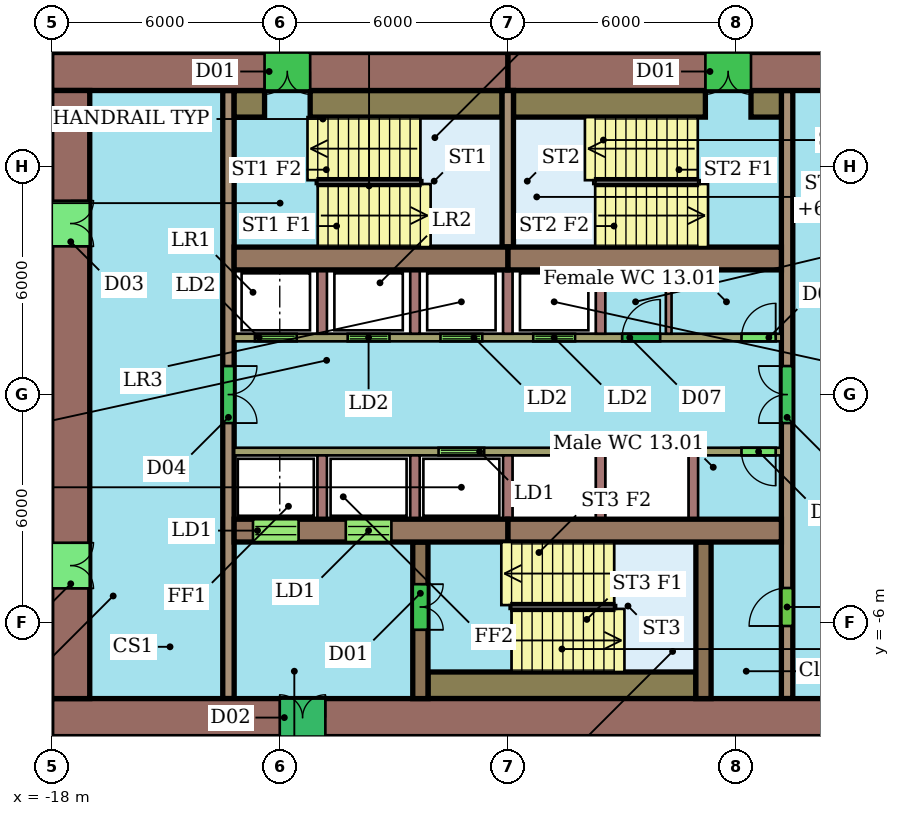
"""IFC4 building model, lengths in metres.
Left out: names, types, materials, properties, quantities, classifications, styles, units other than length and angle.
Written with IfcOpenShell. Run it as: python <this file> out.ifc"""

import sys

from ifc_helpers import new_model, si_unit, direction, frame, frame_2d, origin, place, context, subcontext, project, spatial, rectangle, extrude, element, fill, save


model = new_model("IFC4")
c1 = context("Model", 3, precision=1e-05, world=origin(), true_north=direction((0.0, 1.0)))
c2 = subcontext(c1, "Body", "Model", "MODEL_VIEW")
j1 = project(units=[si_unit("LENGTHUNIT", "METRE"), si_unit("PLANEANGLEUNIT", "RADIAN")], contexts=[c1])
p1 = place(None, origin())
s1 = spatial("IfcSite", under=j1, at=p1, CompositionType="ELEMENT")
p2 = place(p1, origin())
s2 = spatial("IfcBuilding", under=s1, at=p2, CompositionType="ELEMENT")
p3 = place(p2, frame((0.0, 0.0, 65.6)))
s3 = spatial("IfcBuildingStorey", under=s2, at=p3, CompositionType="ELEMENT", Elevation=65.6)
p4 = place(p3, frame((6.0, 8.5, 0.0), z_axis=(0.0, 0.0, 1.0), x_axis=(-1.0, 0.0, 0.0)))
e1 = element("IfcWall", 1, at=p4, inside=s3, PredefinedType="SHEAR", context=c2, shape_type="SweptSolid", body=[
    extrude(rectangle(XDim=12.0, YDim=1.0, at=frame_2d((6.0, 0.0))), origin(), (0.0, 0.0, 1.0), 3.4),
])
p5 = place(p4, frame((5.6, 0.0, 0.0)))
e2 = element("IfcOpeningElement", 2, at=p5, cuts=e1, PredefinedType="OPENING", context=c2, shape_type="SweptSolid", body=[
    extrude(rectangle(XDim=1.2, YDim=2.1, at=frame_2d((0.6, 1.05))), frame((0.0, 0.51, 0.0), z_axis=(0.0, -1.0, 0.0), x_axis=(1.0, 0.0, 0.0)), (0.0, 0.0, 1.0), 1.02),
])
p6 = place(p3, frame((-6.0, 8.5, 0.0), z_axis=(0.0, 0.0, 1.0), x_axis=(-1.0, 0.0, 0.0)))
e3 = element("IfcWall", 3, at=p6, inside=s3, PredefinedType="SHEAR", context=c2, shape_type="SweptSolid", body=[
    extrude(rectangle(XDim=12.0, YDim=1.0, at=frame_2d((6.0, 0.0))), origin(), (0.0, 0.0, 1.0), 3.4),
])
p7 = place(p6, frame((5.2, 0.0, 0.0)))
e4 = element("IfcOpeningElement", 4, at=p7, cuts=e3, PredefinedType="OPENING", context=c2, shape_type="SweptSolid", body=[
    extrude(rectangle(XDim=1.2, YDim=2.1, at=frame_2d((0.6, 1.05))), frame((0.0, 0.51, 0.0), z_axis=(0.0, -1.0, 0.0), x_axis=(1.0, 0.0, 0.0)), (0.0, 0.0, 1.0), 1.02),
])
p8 = place(p3, frame((-18.0, -8.5, 0.0), z_axis=(0.0, 0.0, 1.0), x_axis=(1.0, 0.0, 0.0)))
e5 = element("IfcWall", 5, at=p8, inside=s3, PredefinedType="SHEAR", context=c2, shape_type="SweptSolid", body=[
    extrude(rectangle(XDim=24.0, YDim=1.0, at=frame_2d((12.0, 0.0))), origin(), (0.0, 0.0, 1.0), 3.4),
])
p9 = place(p8, frame((6.0, 0.0, 0.0)))
e6 = element("IfcOpeningElement", 6, at=p9, cuts=e5, PredefinedType="OPENING", context=c2, shape_type="SweptSolid", body=[
    extrude(rectangle(XDim=1.2, YDim=2.1, at=frame_2d((0.6, 1.05))), frame((0.0, 0.51, 0.0), z_axis=(0.0, -1.0, 0.0), x_axis=(1.0, 0.0, 0.0)), (0.0, 0.0, 1.0), 1.02),
])
p10 = place(p3, frame((-17.5, 8.0, 0.0), z_axis=(0.0, 0.0, 1.0), x_axis=(0.0, -1.0, 0.0)))
e7 = element("IfcWall", 7, at=p10, inside=s3, PredefinedType="SHEAR", context=c2, shape_type="SweptSolid", body=[
    extrude(rectangle(XDim=16.0, YDim=1.0, at=frame_2d((8.0, 0.0))), origin(), (0.0, 0.0, 1.0), 3.4),
])
p11 = place(p10, frame((11.9, 0.0, 0.0)))
e8 = element("IfcOpeningElement", 8, at=p11, cuts=e7, PredefinedType="OPENING", context=c2, shape_type="SweptSolid", body=[
    extrude(rectangle(XDim=1.2, YDim=2.1, at=frame_2d((0.6, 1.05))), frame((0.0, 0.51, 0.0), z_axis=(0.0, -1.0, 0.0), x_axis=(1.0, 0.0, 0.0)), (0.0, 0.0, 1.0), 1.02),
])
p12 = place(p10, frame((2.9, 0.0, 0.0)))
e9 = element("IfcOpeningElement", 9, at=p12, cuts=e7, PredefinedType="OPENING", context=c2, shape_type="SweptSolid", body=[
    extrude(rectangle(XDim=1.2, YDim=2.1, at=frame_2d((0.6, 1.05))), frame((0.0, 0.51, 0.0), z_axis=(0.0, -1.0, 0.0), x_axis=(1.0, 0.0, 0.0)), (0.0, 0.0, 1.0), 1.02),
])
for number, where, z_axis, x_axis in (
    (10, (-13.2, 3.58, 0.0), (0.0, 0.0, 1.0), (1.0, 0.0, 0.0)),
    (11, (-6.0, 3.58, 0.0), (0.0, 0.0, 1.0), (1.0, 0.0, 0.0)),
):
    element("IfcWall", number, at=place(p3, frame(where, z_axis=z_axis, x_axis=x_axis)), inside=s3, PredefinedType="SHEAR", context=c2, shape_type="SweptSolid", body=[
        extrude(rectangle(XDim=7.2, YDim=0.6, at=frame_2d((3.6, 0.0))), origin(), (0.0, 0.0, 1.0), 3.4),
    ])
p13 = place(p3, frame((-13.2, -3.58, 0.0), z_axis=(0.0, 0.0, 1.0), x_axis=(1.0, 0.0, 0.0)))
e12 = element("IfcWall", 12, at=p13, inside=s3, PredefinedType="SHEAR", context=c2, shape_type="SweptSolid", body=[
    extrude(rectangle(XDim=7.2, YDim=0.6, at=frame_2d((3.6, 0.0))), origin(), (0.0, 0.0, 1.0), 3.4),
])
p14 = place(p13, frame((0.496, 0.0, 0.0)))
e13 = element("IfcOpeningElement", 13, at=p14, cuts=e12, PredefinedType="OPENING", context=c2, shape_type="SweptSolid", body=[
    extrude(rectangle(XDim=1.2, YDim=2.1, at=frame_2d((0.6, 1.05))), frame((0.0, 0.31, 0.0), z_axis=(0.0, -1.0, 0.0), x_axis=(1.0, 0.0, 0.0)), (0.0, 0.0, 1.0), 0.62),
])
p15 = place(p13, frame((2.938, 0.0, 0.0)))
e14 = element("IfcOpeningElement", 14, at=p15, cuts=e12, PredefinedType="OPENING", context=c2, shape_type="SweptSolid", body=[
    extrude(rectangle(XDim=1.2, YDim=2.1, at=frame_2d((0.6, 1.05))), frame((0.0, 0.31, 0.0), z_axis=(0.0, -1.0, 0.0), x_axis=(1.0, 0.0, 0.0)), (0.0, 0.0, 1.0), 0.62),
])
p16 = place(p3, frame((-6.0, -3.58, 0.0), z_axis=(0.0, 0.0, 1.0), x_axis=(1.0, 0.0, 0.0)))
e15 = element("IfcWall", 15, at=p16, inside=s3, PredefinedType="SHEAR", context=c2, shape_type="SweptSolid", body=[
    extrude(rectangle(XDim=7.2, YDim=0.6, at=frame_2d((3.6, 0.0))), origin(), (0.0, 0.0, 1.0), 3.4),
])
p17 = place(p3, frame((-13.35, 8.0, 0.0), z_axis=(0.0, 0.0, 1.0), x_axis=(0.0, -1.0, 0.0)))
e16 = element("IfcWall", 16, at=p17, inside=s3, PredefinedType="SHEAR", context=c2, shape_type="SweptSolid", body=[
    extrude(rectangle(XDim=16.0, YDim=0.3, at=frame_2d((8.0, 0.0))), origin(), (0.0, 0.0, 1.0), 3.4),
])
p18 = place(p17, frame((7.25, 0.0, 0.0)))
e17 = element("IfcOpeningElement", 17, at=p18, cuts=e16, PredefinedType="OPENING", context=c2, shape_type="SweptSolid", body=[
    extrude(rectangle(XDim=1.5, YDim=2.1, at=frame_2d((0.75, 1.05))), frame((0.0, 0.16, 0.0), z_axis=(0.0, -1.0, 0.0), x_axis=(1.0, 0.0, 0.0)), (0.0, 0.0, 1.0), 0.32),
])
p19 = place(p3, frame((1.35, -8.0, 0.0), z_axis=(0.0, 0.0, 1.0), x_axis=(0.0, 1.0, 0.0)))
e18 = element("IfcWall", 18, at=p19, inside=s3, PredefinedType="SHEAR", context=c2, shape_type="SweptSolid", body=[
    extrude(rectangle(XDim=16.0, YDim=0.3, at=frame_2d((8.0, 0.0))), origin(), (0.0, 0.0, 1.0), 3.4),
])
p20 = place(p19, frame((1.91, 0.0, 0.0)))
e19 = element("IfcOpeningElement", 19, at=p20, cuts=e18, PredefinedType="OPENING", context=c2, shape_type="SweptSolid", body=[
    extrude(rectangle(XDim=1.0, YDim=2.1, at=frame_2d((0.5, 1.05))), frame((0.0, 0.16, 0.0), z_axis=(0.0, -1.0, 0.0), x_axis=(1.0, 0.0, 0.0)), (0.0, 0.0, 1.0), 0.32),
])
p21 = place(p19, frame((7.25, 0.0, 0.0)))
e20 = element("IfcOpeningElement", 20, at=p21, cuts=e18, PredefinedType="OPENING", context=c2, shape_type="SweptSolid", body=[
    extrude(rectangle(XDim=1.5, YDim=2.1, at=frame_2d((0.75, 1.05))), frame((0.0, 0.16, 0.0), z_axis=(0.0, -1.0, 0.0), x_axis=(1.0, 0.0, 0.0)), (0.0, 0.0, 1.0), 0.32),
])
p22 = place(p3, frame((-13.2, 1.5, 0.0), z_axis=(0.0, 0.0, 1.0), x_axis=(1.0, 0.0, 0.0)))
e21 = element("IfcWall", 21, at=p22, inside=s3, PredefinedType="SHEAR", context=c2, shape_type="SweptSolid", body=[
    extrude(rectangle(XDim=14.4, YDim=0.2, at=frame_2d((7.2, 0.0))), origin(), (0.0, 0.0, 1.0), 3.4),
])
p23 = place(p22, frame((0.546, 0.0, 0.0)))
e22 = element("IfcOpeningElement", 22, at=p23, cuts=e21, PredefinedType="OPENING", context=c2, shape_type="SweptSolid", body=[
    extrude(rectangle(XDim=1.1, YDim=2.1, at=frame_2d((0.55, 1.05))), frame((0.0, 0.11, 0.0), z_axis=(0.0, -1.0, 0.0), x_axis=(1.0, 0.0, 0.0)), (0.0, 0.0, 1.0), 0.22),
])
p24 = place(p22, frame((2.988, 0.0, 0.0)))
e23 = element("IfcOpeningElement", 23, at=p24, cuts=e21, PredefinedType="OPENING", context=c2, shape_type="SweptSolid", body=[
    extrude(rectangle(XDim=1.1, YDim=2.1, at=frame_2d((0.55, 1.05))), frame((0.0, 0.11, 0.0), z_axis=(0.0, -1.0, 0.0), x_axis=(1.0, 0.0, 0.0)), (0.0, 0.0, 1.0), 0.22),
])
p25 = place(p22, frame((5.429, 0.0, 0.0)))
e24 = element("IfcOpeningElement", 24, at=p25, cuts=e21, PredefinedType="OPENING", context=c2, shape_type="SweptSolid", body=[
    extrude(rectangle(XDim=1.1, YDim=2.1, at=frame_2d((0.55, 1.05))), frame((0.0, 0.11, 0.0), z_axis=(0.0, -1.0, 0.0), x_axis=(1.0, 0.0, 0.0)), (0.0, 0.0, 1.0), 0.22),
])
p26 = place(p22, frame((7.871, 0.0, 0.0)))
e25 = element("IfcOpeningElement", 25, at=p26, cuts=e21, PredefinedType="OPENING", context=c2, shape_type="SweptSolid", body=[
    extrude(rectangle(XDim=1.1, YDim=2.1, at=frame_2d((0.55, 1.05))), frame((0.0, 0.11, 0.0), z_axis=(0.0, -1.0, 0.0), x_axis=(1.0, 0.0, 0.0)), (0.0, 0.0, 1.0), 0.22),
])
p27 = place(p22, frame((10.21, 0.0, 0.0)))
e26 = element("IfcOpeningElement", 26, at=p27, cuts=e21, PredefinedType="OPENING", context=c2, shape_type="SweptSolid", body=[
    extrude(rectangle(XDim=1.0, YDim=2.1, at=frame_2d((0.5, 1.05))), frame((0.0, 0.11, 0.0), z_axis=(0.0, -1.0, 0.0), x_axis=(1.0, 0.0, 0.0)), (0.0, 0.0, 1.0), 0.22),
])
p28 = place(p22, frame((13.35, 0.0, 0.0)))
e27 = element("IfcOpeningElement", 27, at=p28, cuts=e21, PredefinedType="OPENING", context=c2, shape_type="SweptSolid", body=[
    extrude(rectangle(XDim=0.9, YDim=2.1, at=frame_2d((0.45, 1.05))), frame((0.0, 0.11, 0.0), z_axis=(0.0, -1.0, 0.0), x_axis=(1.0, 0.0, 0.0)), (0.0, 0.0, 1.0), 0.22),
])
p29 = place(p3, frame((1.2, -1.5, 0.0), z_axis=(0.0, 0.0, 1.0), x_axis=(-1.0, 0.0, 0.0)))
e28 = element("IfcWall", 28, at=p29, inside=s3, PredefinedType="SHEAR", context=c2, shape_type="SweptSolid", body=[
    extrude(rectangle(XDim=14.4, YDim=0.2, at=frame_2d((7.2, 0.0))), origin(), (0.0, 0.0, 1.0), 3.4),
])
p30 = place(p29, frame((7.821, 0.0, 0.0)))
e29 = element("IfcOpeningElement", 29, at=p30, cuts=e28, PredefinedType="OPENING", context=c2, shape_type="SweptSolid", body=[
    extrude(rectangle(XDim=1.2, YDim=2.1, at=frame_2d((0.6, 1.05))), frame((0.0, 0.11, 0.0), z_axis=(0.0, -1.0, 0.0), x_axis=(1.0, 0.0, 0.0)), (0.0, 0.0, 1.0), 0.22),
])
p31 = place(p29, frame((0.15, 0.0, 0.0)))
e30 = element("IfcOpeningElement", 30, at=p31, cuts=e28, PredefinedType="OPENING", context=c2, shape_type="SweptSolid", body=[
    extrude(rectangle(XDim=0.9, YDim=2.1, at=frame_2d((0.45, 1.05))), frame((0.0, 0.11, 0.0), z_axis=(0.0, -1.0, 0.0), x_axis=(1.0, 0.0, 0.0)), (0.0, 0.0, 1.0), 0.22),
])
p32 = place(p3, frame((-8.3, -3.88, 0.0), z_axis=(0.0, 0.0, 1.0), x_axis=(0.0, -1.0, 0.0)))
e31 = element("IfcWall", 31, at=p32, inside=s3, PredefinedType="SHEAR", context=c2, shape_type="SweptSolid", body=[
    extrude(rectangle(XDim=4.12, YDim=0.4, at=frame_2d((2.06, 0.0))), origin(), (0.0, 0.0, 1.0), 3.4),
])
p33 = place(p32, frame((1.11, 0.0, 0.0)))
e32 = element("IfcOpeningElement", 32, at=p33, cuts=e31, PredefinedType="OPENING", context=c2, shape_type="SweptSolid", body=[
    extrude(rectangle(XDim=1.2, YDim=2.1, at=frame_2d((0.6, 1.05))), frame((0.0, 0.21, 0.0), z_axis=(0.0, -1.0, 0.0), x_axis=(1.0, 0.0, 0.0)), (0.0, 0.0, 1.0), 0.42),
])
p34 = place(p3, frame((-0.85, -3.88, 0.0), z_axis=(0.0, 0.0, 1.0), x_axis=(0.0, -1.0, 0.0)))
e33 = element("IfcWall", 33, at=p34, inside=s3, PredefinedType="SHEAR", context=c2, shape_type="SweptSolid", body=[
    extrude(rectangle(XDim=4.12, YDim=0.4, at=frame_2d((2.06, 0.0))), origin(), (0.0, 0.0, 1.0), 3.4),
])
p35 = place(p3, frame((-6.0, 3.88, 0.0), z_axis=(0.0, 0.0, 1.0), x_axis=(0.0, 1.0, 0.0)))
e34 = element("IfcWall", 34, at=p35, inside=s3, PredefinedType="SHEAR", context=c2, shape_type="SweptSolid", body=[
    extrude(rectangle(XDim=4.12, YDim=0.3, at=frame_2d((2.06, 0.0))), origin(), (0.0, 0.0, 1.0), 3.4),
])
p36 = place(p3, frame((-13.2, 7.65, 0.0), z_axis=(0.0, 0.0, 1.0), x_axis=(1.0, 0.0, 0.0)))
e35 = element("IfcWall", 35, at=p36, inside=s3, PredefinedType="SHEAR", context=c2, shape_type="SweptSolid", body=[
    extrude(rectangle(XDim=0.8, YDim=0.7, at=frame_2d((0.4, 0.0))), origin(), (0.0, 0.0, 1.0), 3.4),
])
for number, where, z_axis, x_axis in (
    (36, (-11.2, 7.65, 0.0), (0.0, 0.0, 1.0), (1.0, 0.0, 0.0)),
    (37, (-5.85, 7.65, 0.0), (0.0, 0.0, 1.0), (1.0, 0.0, 0.0)),
):
    element("IfcWall", number, at=place(p3, frame(where, z_axis=z_axis, x_axis=x_axis)), inside=s3, PredefinedType="SHEAR", context=c2, shape_type="SweptSolid", body=[
        extrude(rectangle(XDim=5.05, YDim=0.7, at=frame_2d((2.525, 0.0))), origin(), (0.0, 0.0, 1.0), 3.4),
    ])
p37 = place(p3, frame((0.4, 7.65, 0.0), z_axis=(0.0, 0.0, 1.0), x_axis=(1.0, 0.0, 0.0)))
e38 = element("IfcWall", 38, at=p37, inside=s3, PredefinedType="SHEAR", context=c2, shape_type="SweptSolid", body=[
    extrude(rectangle(XDim=0.8, YDim=0.7, at=frame_2d((0.4, 0.0))), origin(), (0.0, 0.0, 1.0), 3.4),
])
p38 = place(p3, frame((-8.1, -7.65, 0.0), z_axis=(0.0, 0.0, 1.0), x_axis=(1.0, 0.0, 0.0)))
e39 = element("IfcWall", 39, at=p38, inside=s3, PredefinedType="SHEAR", context=c2, shape_type="SweptSolid", body=[
    extrude(rectangle(XDim=7.05, YDim=0.7, at=frame_2d((3.525, 0.0))), origin(), (0.0, 0.0, 1.0), 3.4),
])
for number, where, z_axis, x_axis in (
    (40, (-10.883, 1.6, 0.0), (0.0, 0.0, 1.0), (0.0, 1.0, 0.0)),
    (41, (-8.442, 1.6, 0.0), (0.0, 0.0, 1.0), (0.0, 1.0, 0.0)),
    (42, (-6.0, 1.6, 0.0), (0.0, 0.0, 1.0), (0.0, 1.0, 0.0)),
    (43, (-3.558, 1.6, 0.0), (0.0, 0.0, 1.0), (0.0, 1.0, 0.0)),
):
    element("IfcWall", number, at=place(p3, frame(where, z_axis=z_axis, x_axis=x_axis)), inside=s3, PredefinedType="SHEAR", context=c2, shape_type="SweptSolid", body=[
        extrude(rectangle(XDim=1.68, YDim=0.25, at=frame_2d((0.84, 0.0))), origin(), (0.0, 0.0, 1.0), 3.4),
    ])
p39 = place(p3, frame((-1.765, 1.6, 0.0), z_axis=(0.0, 0.0, 1.0), x_axis=(0.0, 1.0, 0.0)))
e44 = element("IfcWall", 44, at=p39, inside=s3, PredefinedType="PARTITIONING", context=c2, shape_type="SweptSolid", body=[
    extrude(rectangle(XDim=1.68, YDim=0.15, at=frame_2d((0.84, 0.0))), origin(), (0.0, 0.0, 1.0), 3.4),
])
for number, where, z_axis, x_axis in (
    (45, (-10.883, -1.6, 0.0), (0.0, 0.0, 1.0), (0.0, -1.0, 0.0)),
    (46, (-8.442, -1.6, 0.0), (0.0, 0.0, 1.0), (0.0, -1.0, 0.0)),
    (47, (-6.0, -1.6, 0.0), (0.0, 0.0, 1.0), (0.0, -1.0, 0.0)),
    (48, (-3.558, -1.6, 0.0), (0.0, 0.0, 1.0), (0.0, -1.0, 0.0)),
    (49, (-1.117, -1.6, 0.0), (0.0, 0.0, 1.0), (0.0, -1.0, 0.0)),
):
    element("IfcWall", number, at=place(p3, frame(where, z_axis=z_axis, x_axis=x_axis)), inside=s3, PredefinedType="SHEAR", context=c2, shape_type="SweptSolid", body=[
        extrude(rectangle(XDim=1.68, YDim=0.25, at=frame_2d((0.84, 0.0))), origin(), (0.0, 0.0, 1.0), 3.4),
    ])
p40 = place(p5, origin())
e50 = element("IfcDoor", 50, at=p40, inside=s3, OperationType="DOUBLE_DOOR_SINGLE_SWING", PredefinedType="NOTDEFINED", context=c2, shape_type="SweptSolid", body=[
    extrude(rectangle(XDim=1.2, YDim=2.1, at=frame_2d((0.6, 1.05))), frame((0.0, 0.025, 0.0), z_axis=(0.0, -1.0, 0.0), x_axis=(1.0, 0.0, 0.0)), (0.0, 0.0, 1.0), 0.05),
])
fill(e2, e50)
p41 = place(p7, origin())
e51 = element("IfcDoor", 51, at=p41, inside=s3, OperationType="DOUBLE_DOOR_SINGLE_SWING", PredefinedType="NOTDEFINED", context=c2, shape_type="SweptSolid", body=[
    extrude(rectangle(XDim=1.2, YDim=2.1, at=frame_2d((0.6, 1.05))), frame((0.0, 0.025, 0.0), z_axis=(0.0, -1.0, 0.0), x_axis=(1.0, 0.0, 0.0)), (0.0, 0.0, 1.0), 0.05),
])
fill(e4, e51)
p42 = place(p9, origin())
e52 = element("IfcDoor", 52, at=p42, inside=s3, OperationType="DOUBLE_DOOR_SINGLE_SWING", PredefinedType="NOTDEFINED", context=c2, shape_type="SweptSolid", body=[
    extrude(rectangle(XDim=1.2, YDim=2.1, at=frame_2d((0.6, 1.05))), frame((0.0, 0.025, 0.0), z_axis=(0.0, -1.0, 0.0), x_axis=(1.0, 0.0, 0.0)), (0.0, 0.0, 1.0), 0.05),
])
fill(e6, e52)
p43 = place(p11, origin())
e53 = element("IfcDoor", 53, at=p43, inside=s3, OperationType="DOUBLE_DOOR_SINGLE_SWING", PredefinedType="NOTDEFINED", context=c2, shape_type="SweptSolid", body=[
    extrude(rectangle(XDim=1.2, YDim=2.1, at=frame_2d((0.6, 1.05))), frame((0.0, 0.025, 0.0), z_axis=(0.0, -1.0, 0.0), x_axis=(1.0, 0.0, 0.0)), (0.0, 0.0, 1.0), 0.05),
])
fill(e8, e53)
p44 = place(p12, origin())
e54 = element("IfcDoor", 54, at=p44, inside=s3, OperationType="DOUBLE_DOOR_SINGLE_SWING", PredefinedType="NOTDEFINED", context=c2, shape_type="SweptSolid", body=[
    extrude(rectangle(XDim=1.2, YDim=2.1, at=frame_2d((0.6, 1.05))), frame((0.0, 0.025, 0.0), z_axis=(0.0, -1.0, 0.0), x_axis=(1.0, 0.0, 0.0)), (0.0, 0.0, 1.0), 0.05),
])
fill(e9, e54)
p45 = place(p14, origin())
e55 = element("IfcDoor", 55, at=p45, inside=s3, OperationType="DOUBLE_DOOR_SLIDING", PredefinedType="NOTDEFINED", context=c2, shape_type="SweptSolid", body=[
    extrude(rectangle(XDim=1.2, YDim=2.1, at=frame_2d((0.6, 1.05))), frame((0.0, 0.025, 0.0), z_axis=(0.0, -1.0, 0.0), x_axis=(1.0, 0.0, 0.0)), (0.0, 0.0, 1.0), 0.05),
])
fill(e13, e55)
p46 = place(p15, origin())
e56 = element("IfcDoor", 56, at=p46, inside=s3, OperationType="DOUBLE_DOOR_SLIDING", PredefinedType="NOTDEFINED", context=c2, shape_type="SweptSolid", body=[
    extrude(rectangle(XDim=1.2, YDim=2.1, at=frame_2d((0.6, 1.05))), frame((0.0, 0.025, 0.0), z_axis=(0.0, -1.0, 0.0), x_axis=(1.0, 0.0, 0.0)), (0.0, 0.0, 1.0), 0.05),
])
fill(e14, e56)
p47 = place(p18, origin())
e57 = element("IfcDoor", 57, at=p47, inside=s3, OperationType="DOUBLE_DOOR_SINGLE_SWING", PredefinedType="NOTDEFINED", context=c2, shape_type="SweptSolid", body=[
    extrude(rectangle(XDim=1.5, YDim=2.1, at=frame_2d((0.75, 1.05))), frame((0.0, 0.025, 0.0), z_axis=(0.0, -1.0, 0.0), x_axis=(1.0, 0.0, 0.0)), (0.0, 0.0, 1.0), 0.05),
])
fill(e17, e57)
p48 = place(p20, origin())
e58 = element("IfcDoor", 58, at=p48, inside=s3, OperationType="SINGLE_SWING_LEFT", PredefinedType="NOTDEFINED", context=c2, shape_type="SweptSolid", body=[
    extrude(rectangle(XDim=1.0, YDim=2.1, at=frame_2d((0.5, 1.05))), frame((0.0, 0.025, 0.0), z_axis=(0.0, -1.0, 0.0), x_axis=(1.0, 0.0, 0.0)), (0.0, 0.0, 1.0), 0.05),
])
fill(e19, e58)
p49 = place(p21, origin())
e59 = element("IfcDoor", 59, at=p49, inside=s3, OperationType="DOUBLE_DOOR_SINGLE_SWING", PredefinedType="NOTDEFINED", context=c2, shape_type="SweptSolid", body=[
    extrude(rectangle(XDim=1.5, YDim=2.1, at=frame_2d((0.75, 1.05))), frame((0.0, 0.025, 0.0), z_axis=(0.0, -1.0, 0.0), x_axis=(1.0, 0.0, 0.0)), (0.0, 0.0, 1.0), 0.05),
])
fill(e20, e59)
p50 = place(p23, origin())
e60 = element("IfcDoor", 60, at=p50, inside=s3, OperationType="DOUBLE_DOOR_SLIDING", PredefinedType="NOTDEFINED", context=c2, shape_type="SweptSolid", body=[
    extrude(rectangle(XDim=1.1, YDim=2.1, at=frame_2d((0.55, 1.05))), frame((0.0, 0.025, 0.0), z_axis=(0.0, -1.0, 0.0), x_axis=(1.0, 0.0, 0.0)), (0.0, 0.0, 1.0), 0.05),
])
fill(e22, e60)
p51 = place(p24, origin())
e61 = element("IfcDoor", 61, at=p51, inside=s3, OperationType="DOUBLE_DOOR_SLIDING", PredefinedType="NOTDEFINED", context=c2, shape_type="SweptSolid", body=[
    extrude(rectangle(XDim=1.1, YDim=2.1, at=frame_2d((0.55, 1.05))), frame((0.0, 0.025, 0.0), z_axis=(0.0, -1.0, 0.0), x_axis=(1.0, 0.0, 0.0)), (0.0, 0.0, 1.0), 0.05),
])
fill(e23, e61)
p52 = place(p25, origin())
e62 = element("IfcDoor", 62, at=p52, inside=s3, OperationType="DOUBLE_DOOR_SLIDING", PredefinedType="NOTDEFINED", context=c2, shape_type="SweptSolid", body=[
    extrude(rectangle(XDim=1.1, YDim=2.1, at=frame_2d((0.55, 1.05))), frame((0.0, 0.025, 0.0), z_axis=(0.0, -1.0, 0.0), x_axis=(1.0, 0.0, 0.0)), (0.0, 0.0, 1.0), 0.05),
])
fill(e24, e62)
p53 = place(p26, origin())
e63 = element("IfcDoor", 63, at=p53, inside=s3, OperationType="DOUBLE_DOOR_SLIDING", PredefinedType="NOTDEFINED", context=c2, shape_type="SweptSolid", body=[
    extrude(rectangle(XDim=1.1, YDim=2.1, at=frame_2d((0.55, 1.05))), frame((0.0, 0.025, 0.0), z_axis=(0.0, -1.0, 0.0), x_axis=(1.0, 0.0, 0.0)), (0.0, 0.0, 1.0), 0.05),
])
fill(e25, e63)
p54 = place(p27, origin())
e64 = element("IfcDoor", 64, at=p54, inside=s3, OperationType="SINGLE_SWING_RIGHT", PredefinedType="NOTDEFINED", context=c2, shape_type="SweptSolid", body=[
    extrude(rectangle(XDim=1.0, YDim=2.1, at=frame_2d((0.5, 1.05))), frame((0.0, 0.025, 0.0), z_axis=(0.0, -1.0, 0.0), x_axis=(1.0, 0.0, 0.0)), (0.0, 0.0, 1.0), 0.05),
])
fill(e26, e64)
p55 = place(p28, origin())
e65 = element("IfcDoor", 65, at=p55, inside=s3, OperationType="SINGLE_SWING_RIGHT", PredefinedType="NOTDEFINED", context=c2, shape_type="SweptSolid", body=[
    extrude(rectangle(XDim=0.9, YDim=2.1, at=frame_2d((0.45, 1.05))), frame((0.0, 0.025, 0.0), z_axis=(0.0, -1.0, 0.0), x_axis=(1.0, 0.0, 0.0)), (0.0, 0.0, 1.0), 0.05),
])
fill(e27, e65)
p56 = place(p30, origin())
e66 = element("IfcDoor", 66, at=p56, inside=s3, OperationType="DOUBLE_DOOR_SLIDING", PredefinedType="NOTDEFINED", context=c2, shape_type="SweptSolid", body=[
    extrude(rectangle(XDim=1.2, YDim=2.1, at=frame_2d((0.6, 1.05))), frame((0.0, 0.025, 0.0), z_axis=(0.0, -1.0, 0.0), x_axis=(1.0, 0.0, 0.0)), (0.0, 0.0, 1.0), 0.05),
])
fill(e29, e66)
p57 = place(p31, origin())
e67 = element("IfcDoor", 67, at=p57, inside=s3, OperationType="SINGLE_SWING_LEFT", PredefinedType="NOTDEFINED", context=c2, shape_type="SweptSolid", body=[
    extrude(rectangle(XDim=0.9, YDim=2.1, at=frame_2d((0.45, 1.05))), frame((0.0, 0.025, 0.0), z_axis=(0.0, -1.0, 0.0), x_axis=(1.0, 0.0, 0.0)), (0.0, 0.0, 1.0), 0.05),
])
fill(e30, e67)
p58 = place(p33, origin())
e68 = element("IfcDoor", 68, at=p58, inside=s3, OperationType="DOUBLE_DOOR_SINGLE_SWING", PredefinedType="NOTDEFINED", context=c2, shape_type="SweptSolid", body=[
    extrude(rectangle(XDim=1.2, YDim=2.1, at=frame_2d((0.6, 1.05))), frame((0.0, 0.025, 0.0), z_axis=(0.0, -1.0, 0.0), x_axis=(1.0, 0.0, 0.0)), (0.0, 0.0, 1.0), 0.05),
])
fill(e32, e68)
save(model, sys.argv[1])
